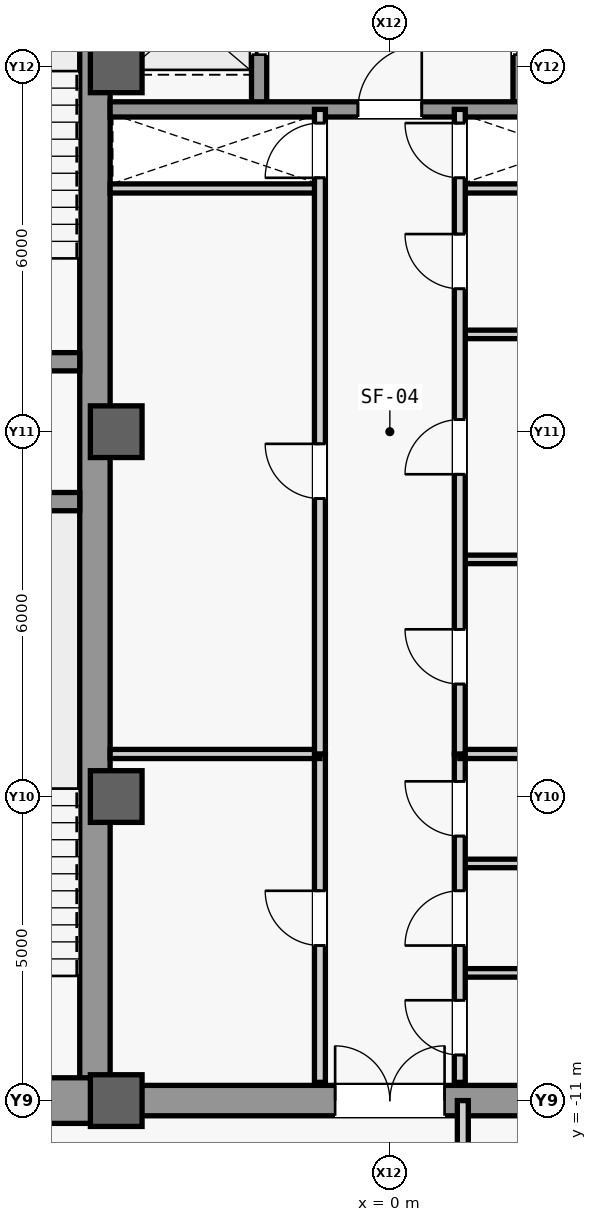
"""IFC4 building model, lengths in metres.
Left out: names, types, materials, properties, quantities, classifications, styles, units other than length and angle.
Written with IfcOpenShell. Run it as: python <this file> out.ifc"""

import sys

from ifc_helpers import new_model, si_unit, direction, frame, frame_2d, origin, origin_2d, place, context, subcontext, project, spatial, rectangle, extrude, source, transform, mapped, element, fill, save


model = new_model("IFC4")
c1 = context("Model", 3, precision=1e-05, world=origin(), true_north=direction((0.0, 1.0)))
c2 = subcontext(c1, "Body", "Model", "MODEL_VIEW")
j1 = project(units=[si_unit("LENGTHUNIT", "METRE"), si_unit("PLANEANGLEUNIT", "RADIAN")], contexts=[c1])
p1 = place(None, origin())
s1 = spatial("IfcSite", under=j1, at=p1, CompositionType="ELEMENT")
p2 = place(p1, origin())
s2 = spatial("IfcBuilding", under=s1, at=p2, CompositionType="ELEMENT")
p3 = place(p2, frame((0.0, 0.0, 183.1)))
s3 = spatial("IfcBuildingStorey", under=s2, at=p3, CompositionType="ELEMENT", Elevation=183.1)
m1 = source(origin(), c2, "Body", "SweptSolid", [
    extrude(rectangle(XDim=21.4, YDim=0.5, at=frame_2d((10.7, 0.0))), origin(), (0.0, 0.0, 1.0), 3.78),
])
p4 = place(p3, frame((-4.85, -10.7, 0.0), z_axis=(0.0, 0.0, 1.0), x_axis=(0.0, 1.0, 0.0)))
e1 = element("IfcWall", 1, at=p4, inside=s3, PredefinedType="SHEAR", context=c2, shape_type="MappedRepresentation", body=[
    mapped(m1, transform((0.0, 0.0, 0.0), scale=1.0)),
])
m2 = source(origin(), c2, "Body", "SweptSolid", [
    extrude(rectangle(XDim=5.85, YDim=0.75, at=frame_2d((2.925, 0.0))), origin(), (0.0, 0.0, 1.0), 3.78),
])
p5 = place(p3, frame((-10.7, -11.0, 0.0), z_axis=(0.0, 0.0, 1.0), x_axis=(1.0, 0.0, 0.0)))
e2 = element("IfcWall", 2, at=p5, inside=s3, PredefinedType="SHEAR", context=c2, shape_type="MappedRepresentation", body=[
    mapped(m2, transform((0.0, 0.0, 0.0), scale=1.0)),
])
m3 = source(origin(), c2, "Body", "SweptSolid", [
    extrude(rectangle(XDim=5.6, YDim=0.3, at=frame_2d((2.8, 0.0))), origin(), (0.0, 0.0, 1.0), 3.78),
])
for number, where, z_axis, x_axis in (
    (3, (-10.7, -1.15, 0.0), (0.0, 0.0, 1.0), (1.0, 0.0, 0.0)),
    (4, (-10.7, 1.15, 0.0), (0.0, 0.0, 1.0), (1.0, 0.0, 0.0)),
):
    element("IfcWall", number, at=place(p3, frame(where, z_axis=z_axis, x_axis=x_axis)), inside=s3, PredefinedType="SHEAR", context=c2, shape_type="MappedRepresentation", body=[
        mapped(m3, transform((0.0, 0.0, 0.0), scale=1.0)),
    ])
m4 = source(origin(), c2, "Body", "SweptSolid", [
    extrude(rectangle(XDim=9.2, YDim=0.5, at=frame_2d((4.6, 0.0))), origin(), (0.0, 0.0, 1.0), 3.78),
])
p6 = place(p3, frame((-4.6, -11.0, 0.0), z_axis=(0.0, 0.0, 1.0), x_axis=(1.0, 0.0, 0.0)))
e5 = element("IfcWall", 5, at=p6, inside=s3, PredefinedType="SHEAR", context=c2, shape_type="MappedRepresentation", body=[
    mapped(m4, transform((0.0, 0.0, 0.0), scale=1.0)),
])
m5 = source(origin(), c2, "Body", "SweptSolid", [
    extrude(rectangle(XDim=1.8, YDim=2.25, at=frame_2d((0.9, 1.125))), frame((0.0, 0.26, 0.0), z_axis=(0.0, -1.0, 0.0), x_axis=(1.0, 0.0, 0.0)), (0.0, 0.0, 1.0), 0.52),
])
p7 = place(p6, frame((3.7, 0.0, 0.0)))
e6 = element("IfcOpeningElement", 6, at=p7, cuts=e5, PredefinedType="OPENING", context=c2, shape_type="MappedRepresentation", body=[
    mapped(m5, transform((0.0, 0.0, 0.0), scale=1.0)),
])
m6 = source(origin(), c2, "Body", "SweptSolid", [
    extrude(rectangle(XDim=0.85, YDim=0.85, at=origin_2d()), origin(), (0.0, 0.0, 1.0), 4.0),
])
for number, where, z_axis, x_axis in (
    (7, (-4.5, -11.0, 0.0), (0.0, 0.0, 1.0), (1.0, 0.0, 0.0)),
    (8, (-4.5, -6.0, 0.0), (0.0, 0.0, 1.0), (1.0, 0.0, 0.0)),
    (9, (-4.5, 0.0, 0.0), (0.0, 0.0, 1.0), (1.0, 0.0, 0.0)),
    (10, (-4.5, 6.0, 0.0), (0.0, 0.0, 1.0), (1.0, 0.0, 0.0)),
):
    element("IfcColumn", number, at=place(p3, frame(where, z_axis=z_axis, x_axis=x_axis)), inside=s3, PredefinedType="COLUMN", context=c2, shape_type="MappedRepresentation", body=[
        mapped(m6, transform((0.0, 0.0, 0.0), scale=1.0)),
    ])
m7 = source(origin(), c2, "Body", "SweptSolid", [
    extrude(rectangle(XDim=3.45, YDim=0.15, at=frame_2d((1.725, 0.0))), origin(), (0.0, 0.0, 1.0), 3.78),
])
for number, where, z_axis, x_axis in (
    (11, (-4.6, 4.0, 0.0), (0.0, 0.0, 1.0), (1.0, 0.0, 0.0)),
    (12, (1.15, 4.0, 0.0), (0.0, 0.0, 1.0), (1.0, 0.0, 0.0)),
):
    element("IfcWall", number, at=place(p3, frame(where, z_axis=z_axis, x_axis=x_axis)), inside=s3, PredefinedType="PARTITIONING", context=c2, shape_type="MappedRepresentation", body=[
        mapped(m7, transform((0.0, 0.0, 0.0), scale=1.0)),
    ])
m8 = source(origin(), c2, "Body", "SweptSolid", [
    extrude(rectangle(XDim=5.4, YDim=0.18, at=frame_2d((2.7, 0.0))), origin(), (0.0, 0.0, 1.0), 3.78),
])
p8 = place(p3, frame((-1.15, -10.7, 0.0), z_axis=(0.0, 0.0, 1.0), x_axis=(0.0, 1.0, 0.0)))
e13 = element("IfcWall", 13, at=p8, inside=s3, PredefinedType="PARTITIONING", context=c2, shape_type="MappedRepresentation", body=[
    mapped(m8, transform((0.0, 0.0, 0.0), scale=1.0)),
])
m9 = source(origin(), c2, "Body", "SweptSolid", [
    extrude(rectangle(XDim=0.9, YDim=2.15, at=frame_2d((0.45, 1.075))), frame((0.0, 0.1, 0.0), z_axis=(0.0, -1.0, 0.0), x_axis=(1.0, 0.0, 0.0)), (0.0, 0.0, 1.0), 0.2),
])
p9 = place(p8, frame((2.25, 0.0, 0.0)))
e14 = element("IfcOpeningElement", 14, at=p9, cuts=e13, PredefinedType="OPENING", context=c2, shape_type="MappedRepresentation", body=[
    mapped(m9, transform((0.0, 0.0, 0.0), scale=1.0)),
])
m10 = source(origin(), c2, "Body", "SweptSolid", [
    extrude(rectangle(XDim=3.45, YDim=0.14, at=frame_2d((1.725, 0.0))), origin(), (0.0, 0.0, 1.0), 3.78),
])
for number, where, z_axis, x_axis in (
    (15, (1.15, -8.9, 0.0), (0.0, 0.0, 1.0), (1.0, 0.0, 0.0)),
    (16, (1.15, -7.1, 0.0), (0.0, 0.0, 1.0), (1.0, 0.0, 0.0)),
):
    element("IfcWall", number, at=place(p3, frame(where, z_axis=z_axis, x_axis=x_axis)), inside=s3, PredefinedType="PARTITIONING", context=c2, shape_type="MappedRepresentation", body=[
        mapped(m10, transform((0.0, 0.0, 0.0), scale=1.0)),
    ])
p10 = place(p3, frame((1.15, -10.7, 0.0), z_axis=(0.0, 0.0, 1.0), x_axis=(0.0, 1.0, 0.0)))
e17 = element("IfcWall", 17, at=p10, inside=s3, PredefinedType="PARTITIONING", context=c2, shape_type="MappedRepresentation", body=[
    mapped(m8, transform((0.0, 0.0, 0.0), scale=1.0)),
])
p11 = place(p10, frame((0.45, 0.0, 0.0)))
e18 = element("IfcOpeningElement", 18, at=p11, cuts=e17, PredefinedType="OPENING", context=c2, shape_type="MappedRepresentation", body=[
    mapped(m9, transform((0.0, 0.0, 0.0), scale=1.0)),
])
p12 = place(p10, frame((2.25, 0.0, 0.0)))
e19 = element("IfcOpeningElement", 19, at=p12, cuts=e17, PredefinedType="OPENING", context=c2, shape_type="MappedRepresentation", body=[
    mapped(m9, transform((0.0, 0.0, 0.0), scale=1.0)),
])
p13 = place(p10, frame((4.05, 0.0, 0.0)))
e20 = element("IfcOpeningElement", 20, at=p13, cuts=e17, PredefinedType="OPENING", context=c2, shape_type="MappedRepresentation", body=[
    mapped(m9, transform((0.0, 0.0, 0.0), scale=1.0)),
])
for number, where, z_axis, x_axis in (
    (21, (-4.6, -5.3, 0.0), (0.0, 0.0, 1.0), (1.0, 0.0, 0.0)),
    (22, (1.15, -5.3, 0.0), (0.0, 0.0, 1.0), (1.0, 0.0, 0.0)),
):
    element("IfcWall", number, at=place(p3, frame(where, z_axis=z_axis, x_axis=x_axis)), inside=s3, PredefinedType="PARTITIONING", context=c2, shape_type="MappedRepresentation", body=[
        mapped(m7, transform((0.0, 0.0, 0.0), scale=1.0)),
    ])
m11 = source(origin(), c2, "Body", "SweptSolid", [
    extrude(rectangle(XDim=5.4, YDim=0.25, at=frame_2d((2.7, 0.0))), origin(), (0.0, 0.0, 1.0), 3.78),
])
p14 = place(p3, frame((-2.15, 5.3, 0.0), z_axis=(0.0, 0.0, 1.0), x_axis=(0.0, 1.0, 0.0)))
e23 = element("IfcWall", 23, at=p14, inside=s3, PredefinedType="SHEAR", context=c2, shape_type="MappedRepresentation", body=[
    mapped(m11, transform((0.0, 0.0, 0.0), scale=1.0)),
])
m12 = source(origin(), c2, "Body", "SweptSolid", [
    extrude(rectangle(XDim=1.2, YDim=2.3, at=frame_2d((0.6, 1.15))), frame((0.0, 0.135, 0.0), z_axis=(0.0, -1.0, 0.0), x_axis=(1.0, 0.0, 0.0)), (0.0, 0.0, 1.0), 0.27),
])
p15 = place(p14, frame((3.3, 0.0, 0.0)))
e24 = element("IfcOpeningElement", 24, at=p15, cuts=e23, PredefinedType="OPENING", context=c2, shape_type="MappedRepresentation", body=[
    mapped(m12, transform((0.0, 0.0, 0.0), scale=1.0)),
])
p16 = place(p14, frame((0.9, 0.0, 0.0)))
e25 = element("IfcOpeningElement", 25, at=p16, cuts=e23, PredefinedType="OPENING", context=c2, shape_type="MappedRepresentation", body=[
    mapped(m12, transform((0.0, 0.0, 0.0), scale=1.0)),
])
p17 = place(p3, frame((2.15, 5.3, 0.0), z_axis=(0.0, 0.0, 1.0), x_axis=(0.0, 1.0, 0.0)))
e26 = element("IfcWall", 26, at=p17, inside=s3, PredefinedType="SHEAR", context=c2, shape_type="MappedRepresentation", body=[
    mapped(m11, transform((0.0, 0.0, 0.0), scale=1.0)),
])
p18 = place(p17, frame((3.3, 0.0, 0.0)))
e27 = element("IfcOpeningElement", 27, at=p18, cuts=e26, PredefinedType="OPENING", context=c2, shape_type="MappedRepresentation", body=[
    mapped(m12, transform((0.0, 0.0, 0.0), scale=1.0)),
])
p19 = place(p17, frame((0.9, 0.0, 0.0)))
e28 = element("IfcOpeningElement", 28, at=p19, cuts=e26, PredefinedType="OPENING", context=c2, shape_type="MappedRepresentation", body=[
    mapped(m12, transform((0.0, 0.0, 0.0), scale=1.0)),
])
m13 = source(origin(), c2, "Body", "SweptSolid", [
    extrude(rectangle(XDim=9.2, YDim=0.25, at=frame_2d((4.6, 0.0))), origin(), (0.0, 0.0, 1.0), 3.78),
])
p20 = place(p3, frame((-4.6, 5.3, 0.0), z_axis=(0.0, 0.0, 1.0), x_axis=(1.0, 0.0, 0.0)))
e29 = element("IfcWall", 29, at=p20, inside=s3, PredefinedType="SHEAR", context=c2, shape_type="MappedRepresentation", body=[
    mapped(m13, transform((0.0, 0.0, 0.0), scale=1.0)),
])
m14 = source(origin(), c2, "Body", "SweptSolid", [
    extrude(rectangle(XDim=1.05, YDim=2.2, at=frame_2d((0.525, 1.1))), frame((0.0, 0.135, 0.0), z_axis=(0.0, -1.0, 0.0), x_axis=(1.0, 0.0, 0.0)), (0.0, 0.0, 1.0), 0.27),
])
p21 = place(p20, frame((4.075, 0.0, 0.0)))
e30 = element("IfcOpeningElement", 30, at=p21, cuts=e29, PredefinedType="OPENING", context=c2, shape_type="MappedRepresentation", body=[
    mapped(m14, transform((0.0, 0.0, 0.0), scale=1.0)),
])
m15 = source(origin(), c2, "Body", "SweptSolid", [
    extrude(rectangle(XDim=10.6, YDim=0.18, at=frame_2d((5.3, 0.0))), origin(), (0.0, 0.0, 1.0), 3.78),
])
p22 = place(p3, frame((-1.15, -5.3, 0.0), z_axis=(0.0, 0.0, 1.0), x_axis=(0.0, 1.0, 0.0)))
e31 = element("IfcWall", 31, at=p22, inside=s3, PredefinedType="PARTITIONING", context=c2, shape_type="MappedRepresentation", body=[
    mapped(m15, transform((0.0, 0.0, 0.0), scale=1.0)),
])
p23 = place(p22, frame((4.2, 0.0, 0.0)))
e32 = element("IfcOpeningElement", 32, at=p23, cuts=e31, PredefinedType="OPENING", context=c2, shape_type="MappedRepresentation", body=[
    mapped(m9, transform((0.0, 0.0, 0.0), scale=1.0)),
])
p24 = place(p22, frame((9.475, 0.0, 0.0)))
e33 = element("IfcOpeningElement", 33, at=p24, cuts=e31, PredefinedType="OPENING", context=c2, shape_type="MappedRepresentation", body=[
    mapped(m9, transform((0.0, 0.0, 0.0), scale=1.0)),
])
for number, where, z_axis, x_axis in (
    (34, (1.15, -2.1, 0.0), (0.0, 0.0, 1.0), (1.0, 0.0, 0.0)),
    (35, (1.15, 1.6, 0.0), (0.0, 0.0, 1.0), (1.0, 0.0, 0.0)),
):
    element("IfcWall", number, at=place(p3, frame(where, z_axis=z_axis, x_axis=x_axis)), inside=s3, PredefinedType="PARTITIONING", context=c2, shape_type="MappedRepresentation", body=[
        mapped(m10, transform((0.0, 0.0, 0.0), scale=1.0)),
    ])
p25 = place(p3, frame((1.15, -5.3, 0.0), z_axis=(0.0, 0.0, 1.0), x_axis=(0.0, 1.0, 0.0)))
e36 = element("IfcWall", 36, at=p25, inside=s3, PredefinedType="PARTITIONING", context=c2, shape_type="MappedRepresentation", body=[
    mapped(m15, transform((0.0, 0.0, 0.0), scale=1.0)),
])
p26 = place(p25, frame((1.15, 0.0, 0.0)))
e37 = element("IfcOpeningElement", 37, at=p26, cuts=e36, PredefinedType="OPENING", context=c2, shape_type="MappedRepresentation", body=[
    mapped(m9, transform((0.0, 0.0, 0.0), scale=1.0)),
])
p27 = place(p25, frame((4.6, 0.0, 0.0)))
e38 = element("IfcOpeningElement", 38, at=p27, cuts=e36, PredefinedType="OPENING", context=c2, shape_type="MappedRepresentation", body=[
    mapped(m9, transform((0.0, 0.0, 0.0), scale=1.0)),
])
p28 = place(p25, frame((7.65, 0.0, 0.0)))
e39 = element("IfcOpeningElement", 39, at=p28, cuts=e36, PredefinedType="OPENING", context=c2, shape_type="MappedRepresentation", body=[
    mapped(m9, transform((0.0, 0.0, 0.0), scale=1.0)),
])
p29 = place(p25, frame((9.475, 0.0, 0.0)))
e40 = element("IfcOpeningElement", 40, at=p29, cuts=e36, PredefinedType="OPENING", context=c2, shape_type="MappedRepresentation", body=[
    mapped(m9, transform((0.0, 0.0, 0.0), scale=1.0)),
])
m16 = source(origin(), c2, "Body", "SweptSolid", [
    extrude(rectangle(XDim=2.6, YDim=0.18, at=frame_2d((1.3, 0.0))), origin(), (0.0, 0.0, 1.0), 3.78),
])
p30 = place(p3, frame((1.2, -13.6, 0.0), z_axis=(0.0, 0.0, 1.0), x_axis=(0.0, 1.0, 0.0)))
e41 = element("IfcWall", 41, at=p30, inside=s3, PredefinedType="PARTITIONING", context=c2, shape_type="MappedRepresentation", body=[
    mapped(m16, transform((0.0, 0.0, 0.0), scale=1.0)),
])
m17 = source(origin(), c2, "Body", "SweptSolid", [
    extrude(rectangle(XDim=0.9, YDim=2.15, at=frame_2d((0.45, 1.075))), frame((0.0, 0.025, 0.0), z_axis=(0.0, -1.0, 0.0), x_axis=(1.0, 0.0, 0.0)), (0.0, 0.0, 1.0), 0.05),
])
p31 = place(p9, origin())
e42 = element("IfcDoor", 42, at=p31, inside=s3, OperationType="SINGLE_SWING_RIGHT", PredefinedType="DOOR", context=c2, shape_type="MappedRepresentation", body=[
    mapped(m17, transform((0.0, 0.0, 0.0), scale=1.0)),
])
fill(e14, e42)
p32 = place(p11, origin())
e43 = element("IfcDoor", 43, at=p32, inside=s3, OperationType="SINGLE_SWING_RIGHT", PredefinedType="DOOR", context=c2, shape_type="MappedRepresentation", body=[
    mapped(m17, transform((0.0, 0.0, 0.0), scale=1.0)),
])
fill(e18, e43)
p33 = place(p12, origin())
e44 = element("IfcDoor", 44, at=p33, inside=s3, OperationType="SINGLE_SWING_LEFT", PredefinedType="DOOR", context=c2, shape_type="MappedRepresentation", body=[
    mapped(m17, transform((0.0, 0.0, 0.0), scale=1.0)),
])
fill(e19, e44)
p34 = place(p13, origin())
e45 = element("IfcDoor", 45, at=p34, inside=s3, OperationType="SINGLE_SWING_RIGHT", PredefinedType="DOOR", context=c2, shape_type="MappedRepresentation", body=[
    mapped(m17, transform((0.0, 0.0, 0.0), scale=1.0)),
])
fill(e20, e45)
m18 = source(origin(), c2, "Body", "SweptSolid", [
    extrude(rectangle(XDim=1.8, YDim=2.25, at=frame_2d((0.9, 1.125))), frame((0.0, 0.025, 0.0), z_axis=(0.0, -1.0, 0.0), x_axis=(1.0, 0.0, 0.0)), (0.0, 0.0, 1.0), 0.05),
])
p35 = place(p7, origin())
e46 = element("IfcDoor", 46, at=p35, inside=s3, OperationType="SINGLE_SWING_LEFT", PredefinedType="DOOR", context=c2, shape_type="MappedRepresentation", body=[
    mapped(m18, transform((0.0, 0.0, 0.0), scale=1.0)),
])
fill(e6, e46)
m19 = source(origin(), c2, "Body", "SweptSolid", [
    extrude(rectangle(XDim=1.05, YDim=2.2, at=frame_2d((0.525, 1.1))), frame((0.0, 0.025, 0.0), z_axis=(0.0, -1.0, 0.0), x_axis=(1.0, 0.0, 0.0)), (0.0, 0.0, 1.0), 0.05),
])
p36 = place(p21, origin())
e47 = element("IfcDoor", 47, at=p36, inside=s3, OperationType="SINGLE_SWING_RIGHT", PredefinedType="DOOR", context=c2, shape_type="MappedRepresentation", body=[
    mapped(m19, transform((0.0, 0.0, 0.0), scale=1.0)),
])
fill(e30, e47)
p37 = place(p23, origin())
e48 = element("IfcDoor", 48, at=p37, inside=s3, OperationType="SINGLE_SWING_RIGHT", PredefinedType="DOOR", context=c2, shape_type="MappedRepresentation", body=[
    mapped(m17, transform((0.0, 0.0, 0.0), scale=1.0)),
])
fill(e32, e48)
p38 = place(p26, origin())
e49 = element("IfcDoor", 49, at=p38, inside=s3, OperationType="SINGLE_SWING_RIGHT", PredefinedType="DOOR", context=c2, shape_type="MappedRepresentation", body=[
    mapped(m17, transform((0.0, 0.0, 0.0), scale=1.0)),
])
fill(e37, e49)
p39 = place(p27, origin())
e50 = element("IfcDoor", 50, at=p39, inside=s3, OperationType="SINGLE_SWING_LEFT", PredefinedType="DOOR", context=c2, shape_type="MappedRepresentation", body=[
    mapped(m17, transform((0.0, 0.0, 0.0), scale=1.0)),
])
fill(e38, e50)
p40 = place(p28, origin())
e51 = element("IfcDoor", 51, at=p40, inside=s3, OperationType="SINGLE_SWING_RIGHT", PredefinedType="DOOR", context=c2, shape_type="MappedRepresentation", body=[
    mapped(m17, transform((0.0, 0.0, 0.0), scale=1.0)),
])
fill(e39, e51)
p41 = place(p24, origin())
e52 = element("IfcDoor", 52, at=p41, inside=s3, OperationType="SINGLE_SWING_LEFT", PredefinedType="DOOR", context=c2, shape_type="MappedRepresentation", body=[
    mapped(m17, transform((0.0, 0.0, 0.0), scale=1.0)),
])
fill(e33, e52)
p42 = place(p29, origin())
e53 = element("IfcDoor", 53, at=p42, inside=s3, OperationType="SINGLE_SWING_RIGHT", PredefinedType="DOOR", context=c2, shape_type="MappedRepresentation", body=[
    mapped(m17, transform((0.0, 0.0, 0.0), scale=1.0)),
])
fill(e40, e53)
m20 = source(origin(), c2, "Body", "SweptSolid", [
    extrude(rectangle(XDim=1.2, YDim=2.3, at=frame_2d((0.6, 1.15))), frame((0.0, 0.025, 0.0), z_axis=(0.0, -1.0, 0.0), x_axis=(1.0, 0.0, 0.0)), (0.0, 0.0, 1.0), 0.05),
])
p43 = place(p16, origin())
e54 = element("IfcDoor", 54, at=p43, inside=s3, OperationType="SLIDING_TO_LEFT", PredefinedType="DOOR", context=c2, shape_type="MappedRepresentation", body=[
    mapped(m20, transform((0.0, 0.0, 0.0), scale=1.0)),
])
fill(e25, e54)
save(model, sys.argv[1])
